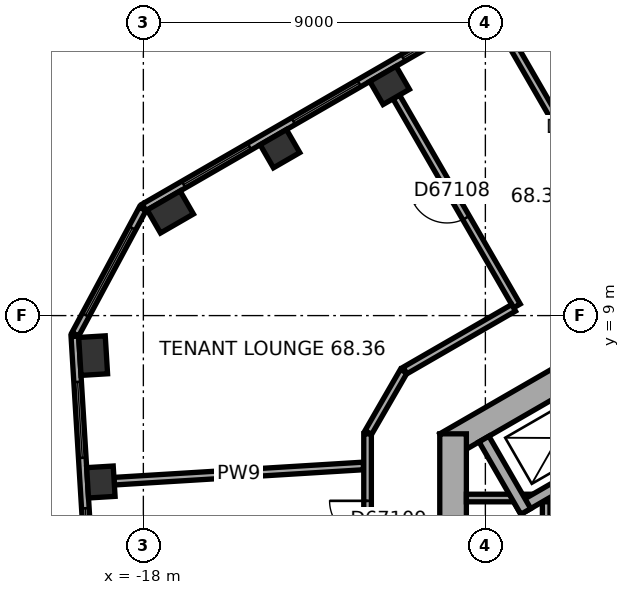
"""IFC4 building model, lengths in metres.
Left out: names, types, materials, properties, quantities, classifications, styles, units other than length and angle.
Written with IfcOpenShell. Run it as: python <this file> out.ifc"""

import sys

from ifc_helpers import new_model, si_unit, direction, frame, frame_2d, origin, origin_2d, place, context, subcontext, project, spatial, rectangle, extrude, element, fill, save


model = new_model("IFC4")
c1 = context("Model", 3, precision=1e-05, world=origin(), true_north=direction((0.0, 1.0)))
c2 = subcontext(c1, "Body", "Model", "MODEL_VIEW")
j1 = project(units=[si_unit("LENGTHUNIT", "METRE"), si_unit("PLANEANGLEUNIT", "RADIAN")], contexts=[c1])
p1 = place(None, origin())
s1 = spatial("IfcSite", under=j1, at=p1, CompositionType="ELEMENT")
p2 = place(p1, origin())
s2 = spatial("IfcBuilding", under=s1, at=p2, CompositionType="ELEMENT")
p3 = place(p2, frame((0.0, 0.0, 274.6)))
s3 = spatial("IfcBuildingStorey", under=s2, at=p3, CompositionType="ELEMENT", Elevation=274.6)
for number, where, z_axis, x_axis in (
    (1, (-11.52, 15.057, 0.0), (0.0, 0.0, 1.0), (-0.866, -0.5, 0.0)),
    (2, (-14.406, 13.391, 0.0), (0.0, 0.0, 1.0), (-0.866, -0.5, 0.0)),
):
    element("IfcColumn", number, at=place(p3, frame(where, z_axis=z_axis, x_axis=x_axis)), inside=s3, PredefinedType="COLUMN", context=c2, shape_type="SweptSolid", body=[
        extrude(rectangle(XDim=0.8, YDim=0.7, at=origin_2d()), origin(), (0.0, 0.0, 1.0), 3.7),
    ])
for number, where, z_axis, x_axis in (
    (3, (-17.291, 11.726, 0.0), (0.0, 0.0, 1.0), (-0.866, -0.5, 0.0)),
    (4, (-19.321, 7.947, 0.0), (0.0, 0.0, 1.0), (0.061, -0.998, 0.0)),
):
    element("IfcColumn", number, at=place(p3, frame(where, z_axis=z_axis, x_axis=x_axis)), inside=s3, PredefinedType="COLUMN", context=c2, shape_type="SweptSolid", body=[
        extrude(rectangle(XDim=1.0, YDim=0.7, at=origin_2d()), origin(), (0.0, 0.0, 1.0), 3.7),
    ])
p4 = place(p3, frame((-19.118, 4.621, 0.0), z_axis=(0.0, 0.0, 1.0), x_axis=(0.061048539535, -0.998134798422, 0.0)))
e5 = element("IfcColumn", 5, at=p4, inside=s3, PredefinedType="COLUMN", context=c2, shape_type="SweptSolid", body=[
    extrude(rectangle(XDim=0.8, YDim=0.7, at=origin_2d()), origin(), (0.0, 0.0, 1.0), 3.7),
])
p5 = place(p3, frame((0.175, 11.475, 0.0), z_axis=(0.0, 0.0, 1.0), x_axis=(-0.866026453023, -0.499998182661, 0.0)))
e6 = element("IfcWall", 6, at=p5, inside=s3, PredefinedType="SHEAR", context=c2, shape_type="SweptSolid", body=[
    extrude(rectangle(XDim=11.778, YDim=0.7, at=frame_2d((5.889, 0.0))), origin(), (0.0, 0.0, 1.0), 3.7),
])
p6 = place(p5, frame((6.089, 0.0, 0.0)))
e7 = element("IfcOpeningElement", 7, at=p6, cuts=e6, PredefinedType="OPENING", context=c2, shape_type="SweptSolid", body=[
    extrude(rectangle(XDim=1.5, YDim=2.1, at=frame_2d((0.75, 1.05))), frame((0.0, 0.36, 0.0), z_axis=(0.0, -1.0, 0.0), x_axis=(1.0, 0.0, 0.0)), (0.0, 0.0, 1.0), 0.72),
])
p7 = place(p5, frame((1.639, 0.0, 0.0)))
e8 = element("IfcOpeningElement", 8, at=p7, cuts=e6, PredefinedType="OPENING", context=c2, shape_type="SweptSolid", body=[
    extrude(rectangle(XDim=0.9, YDim=2.1, at=frame_2d((0.45, 1.05))), frame((0.0, 0.36, 0.0), z_axis=(0.0, -1.0, 0.0), x_axis=(1.0, 0.0, 0.0)), (0.0, 0.0, 1.0), 0.72),
])
p8 = place(p5, frame((4.239, 0.0, 0.0)))
e9 = element("IfcOpeningElement", 9, at=p8, cuts=e6, PredefinedType="OPENING", context=c2, shape_type="SweptSolid", body=[
    extrude(rectangle(XDim=0.9, YDim=2.1, at=frame_2d((0.45, 1.05))), frame((0.0, 0.36, 0.0), z_axis=(0.0, -1.0, 0.0), x_axis=(1.0, 0.0, 0.0)), (0.0, 0.0, 1.0), 0.72),
])
p9 = place(p3, frame((-9.85, 5.889, 0.0), z_axis=(0.0, 0.0, 1.0), x_axis=(0.0, -1.0, 0.0)))
e10 = element("IfcWall", 10, at=p9, inside=s3, PredefinedType="SHEAR", context=c2, shape_type="SweptSolid", body=[
    extrude(rectangle(XDim=11.778, YDim=0.7, at=frame_2d((5.889, 0.0))), origin(), (0.0, 0.0, 1.0), 3.7),
])
p10 = place(p9, frame((5.039, 0.0, 0.0)))
e11 = element("IfcOpeningElement", 11, at=p10, cuts=e10, PredefinedType="OPENING", context=c2, shape_type="SweptSolid", body=[
    extrude(rectangle(XDim=1.1, YDim=2.1, at=frame_2d((0.55, 1.05))), frame((0.0, 0.36, 0.0), z_axis=(0.0, -1.0, 0.0), x_axis=(1.0, 0.0, 0.0)), (0.0, 0.0, 1.0), 0.72),
])
p11 = place(p9, frame((7.639, 0.0, 0.0)))
e12 = element("IfcOpeningElement", 12, at=p11, cuts=e10, PredefinedType="OPENING", context=c2, shape_type="SweptSolid", body=[
    extrude(rectangle(XDim=1.1, YDim=2.1, at=frame_2d((0.55, 1.05))), frame((0.0, 0.36, 0.0), z_axis=(0.0, -1.0, 0.0), x_axis=(1.0, 0.0, 0.0)), (0.0, 0.0, 1.0), 0.72),
])
p12 = place(p3, frame((-2.624, 20.713, 0.0), z_axis=(0.0, 0.0, 1.0), x_axis=(-0.866026460444, -0.499998169808, 0.0)))
e13 = element("IfcWall", 13, at=p12, inside=s3, PredefinedType="STANDARD", context=c2, shape_type="SweptSolid", body=[
    extrude(rectangle(XDim=17.731, YDim=0.2, at=frame_2d((8.866, 0.0))), origin(), (0.0, 0.0, 1.0), 3.7),
])
p13 = place(p12, frame((1.203, 0.0, 0.9)))
e14 = element("IfcOpeningElement", 14, at=p13, cuts=e13, PredefinedType="OPENING", context=c2, shape_type="SweptSolid", body=[
    extrude(rectangle(XDim=2.0, YDim=2.0, at=frame_2d((1.0, 1.0))), frame((0.0, 0.11, 0.0), z_axis=(0.0, -1.0, 0.0), x_axis=(1.0, 0.0, 0.0)), (0.0, 0.0, 1.0), 0.22),
])
p14 = place(p12, frame((4.535, 0.0, 0.9)))
e15 = element("IfcOpeningElement", 15, at=p14, cuts=e13, PredefinedType="OPENING", context=c2, shape_type="SweptSolid", body=[
    extrude(rectangle(XDim=2.0, YDim=2.0, at=frame_2d((1.0, 1.0))), frame((0.0, 0.11, 0.0), z_axis=(0.0, -1.0, 0.0), x_axis=(1.0, 0.0, 0.0)), (0.0, 0.0, 1.0), 0.22),
])
p15 = place(p12, frame((7.867, 0.0, 0.9)))
e16 = element("IfcOpeningElement", 16, at=p15, cuts=e13, PredefinedType="OPENING", context=c2, shape_type="SweptSolid", body=[
    extrude(rectangle(XDim=2.0, YDim=2.0, at=frame_2d((1.0, 1.0))), frame((0.0, 0.11, 0.0), z_axis=(0.0, -1.0, 0.0), x_axis=(1.0, 0.0, 0.0)), (0.0, 0.0, 1.0), 0.22),
])
p16 = place(p12, frame((11.198, 0.0, 0.9)))
e17 = element("IfcOpeningElement", 17, at=p16, cuts=e13, PredefinedType="OPENING", context=c2, shape_type="SweptSolid", body=[
    extrude(rectangle(XDim=2.0, YDim=2.0, at=frame_2d((1.0, 1.0))), frame((0.0, 0.11, 0.0), z_axis=(0.0, -1.0, 0.0), x_axis=(1.0, 0.0, 0.0)), (0.0, 0.0, 1.0), 0.22),
])
p17 = place(p12, frame((14.53, 0.0, 0.9)))
e18 = element("IfcOpeningElement", 18, at=p17, cuts=e13, PredefinedType="OPENING", context=c2, shape_type="SweptSolid", body=[
    extrude(rectangle(XDim=2.0, YDim=2.0, at=frame_2d((1.0, 1.0))), frame((0.0, 0.11, 0.0), z_axis=(0.0, -1.0, 0.0), x_axis=(1.0, 0.0, 0.0)), (0.0, 0.0, 1.0), 0.22),
])
p18 = place(p3, frame((-18.018, 11.808, 0.0), z_axis=(0.0, 0.0, 1.0), x_axis=(-0.473318619185, -0.880891301315, 0.0)))
e19 = element("IfcWall", 19, at=p18, inside=s3, PredefinedType="STANDARD", context=c2, shape_type="SweptSolid", body=[
    extrude(rectangle(XDim=3.747, YDim=0.2, at=frame_2d((1.874, 0.0))), origin(), (0.0, 0.0, 1.0), 3.7),
])
p19 = place(p18, frame((0.573, 0.0, 0.9)))
e20 = element("IfcOpeningElement", 20, at=p19, cuts=e19, PredefinedType="OPENING", context=c2, shape_type="SweptSolid", body=[
    extrude(rectangle(XDim=2.6, YDim=2.0, at=frame_2d((1.3, 1.0))), frame((0.0, 0.11, 0.0), z_axis=(0.0, -1.0, 0.0), x_axis=(1.0, 0.0, 0.0)), (0.0, 0.0, 1.0), 0.22),
])
p20 = place(p3, frame((-19.803, 8.454, 0.0), z_axis=(0.0, 0.0, 1.0), x_axis=(0.061036717565, -0.998135521414, 0.0)))
e21 = element("IfcWall", 21, at=p20, inside=s3, PredefinedType="STANDARD", context=c2, shape_type="SweptSolid", body=[
    extrude(rectangle(XDim=17.731, YDim=0.2, at=frame_2d((8.866, 0.0))), origin(), (0.0, 0.0, 1.0), 3.7),
])
p21 = place(p20, frame((1.202, 0.0, 0.9)))
e22 = element("IfcOpeningElement", 22, at=p21, cuts=e21, PredefinedType="OPENING", context=c2, shape_type="SweptSolid", body=[
    extrude(rectangle(XDim=2.0, YDim=2.0, at=frame_2d((1.0, 1.0))), frame((0.0, 0.11, 0.0), z_axis=(0.0, -1.0, 0.0), x_axis=(1.0, 0.0, 0.0)), (0.0, 0.0, 1.0), 0.22),
])
p22 = place(p20, frame((4.533, 0.0, 0.9)))
e23 = element("IfcOpeningElement", 23, at=p22, cuts=e21, PredefinedType="OPENING", context=c2, shape_type="SweptSolid", body=[
    extrude(rectangle(XDim=2.0, YDim=2.0, at=frame_2d((1.0, 1.0))), frame((0.0, 0.11, 0.0), z_axis=(0.0, -1.0, 0.0), x_axis=(1.0, 0.0, 0.0)), (0.0, 0.0, 1.0), 0.22),
])
p23 = place(p20, frame((7.865, 0.0, 0.9)))
e24 = element("IfcOpeningElement", 24, at=p23, cuts=e21, PredefinedType="OPENING", context=c2, shape_type="SweptSolid", body=[
    extrude(rectangle(XDim=2.0, YDim=2.0, at=frame_2d((1.0, 1.0))), frame((0.0, 0.11, 0.0), z_axis=(0.0, -1.0, 0.0), x_axis=(1.0, 0.0, 0.0)), (0.0, 0.0, 1.0), 0.22),
])
p24 = place(p20, frame((11.197, 0.0, 0.9)))
e25 = element("IfcOpeningElement", 25, at=p24, cuts=e21, PredefinedType="OPENING", context=c2, shape_type="SweptSolid", body=[
    extrude(rectangle(XDim=2.0, YDim=2.0, at=frame_2d((1.0, 1.0))), frame((0.0, 0.11, 0.0), z_axis=(0.0, -1.0, 0.0), x_axis=(1.0, 0.0, 0.0)), (0.0, 0.0, 1.0), 0.22),
])
p25 = place(p20, frame((14.528, 0.0, 0.9)))
e26 = element("IfcOpeningElement", 26, at=p25, cuts=e21, PredefinedType="OPENING", context=c2, shape_type="SweptSolid", body=[
    extrude(rectangle(XDim=2.0, YDim=2.0, at=frame_2d((1.0, 1.0))), frame((0.0, 0.11, 0.0), z_axis=(0.0, -1.0, 0.0), x_axis=(1.0, 0.0, 0.0)), (0.0, 0.0, 1.0), 0.22),
])
p26 = place(p3, frame((-7.4, 4.3, 0.0), z_axis=(0.0, 0.0, 1.0), x_axis=(0.0, -1.0, 0.0)))
e27 = element("IfcWall", 27, at=p26, inside=s3, PredefinedType="PARTITIONING", context=c2, shape_type="SweptSolid", body=[
    extrude(rectangle(XDim=8.0, YDim=0.2, at=frame_2d((4.0, 0.0))), origin(), (0.0, 0.0, 1.0), 3.35),
])
p27 = place(p3, frame((-7.3, 4.2, 0.0), z_axis=(0.0, 0.0, 1.0), x_axis=(-1.0, 0.0, 0.0)))
e28 = element("IfcWall", 28, at=p27, inside=s3, PredefinedType="PARTITIONING", context=c2, shape_type="SweptSolid", body=[
    extrude(rectangle(XDim=2.2, YDim=0.2, at=frame_2d((1.1, 0.0))), origin(), (0.0, 0.0, 1.0), 3.35),
])
p28 = place(p3, frame((-5.24, 5.577, 0.0), z_axis=(0.0, 0.0, 1.0), x_axis=(-0.866014461049, -0.500018952895, 0.0)))
e29 = element("IfcWall", 29, at=p28, inside=s3, PredefinedType="SHEAR", context=c2, shape_type="SweptSolid", body=[
    extrude(rectangle(XDim=3.35, YDim=0.3, at=frame_2d((1.675, 0.0))), origin(), (0.0, 0.0, 1.0), 3.35),
])
p29 = place(p3, frame((-7.937, 3.847, 0.0), z_axis=(0.0, 0.0, 1.0), x_axis=(-0.50002983664, 0.866008176907, 0.0)))
e30 = element("IfcWall", 30, at=p29, inside=s3, PredefinedType="SHEAR", context=c2, shape_type="SweptSolid", body=[
    extrude(rectangle(XDim=2.2, YDim=0.3, at=frame_2d((1.1, 0.0))), origin(), (0.0, 0.0, 1.0), 3.35),
])
p30 = place(p3, frame((-18.768, 4.643, 0.0), z_axis=(0.0, 0.0, 1.0), x_axis=(0.99813496285, 0.0610458511, 0.0)))
e31 = element("IfcWall", 31, at=p30, inside=s3, PredefinedType="PARTITIONING", context=c2, shape_type="SweptSolid", body=[
    extrude(rectangle(XDim=6.571, YDim=0.2, at=frame_2d((3.285, 0.0))), origin(), (0.0, 0.0, 1.0), 3.35),
])
p31 = place(p3, frame((-12.1, 5.889, 0.0), z_axis=(0.0, 0.0, 1.0), x_axis=(0.0, -1.0, 0.0)))
e32 = element("IfcWall", 32, at=p31, inside=s3, PredefinedType="PARTITIONING", context=c2, shape_type="SweptSolid", body=[
    extrude(rectangle(XDim=3.688, YDim=0.2, at=frame_2d((1.844, 0.0))), origin(), (0.0, 0.0, 1.0), 3.35),
])
p32 = place(p31, frame((1.763, 0.0, 0.0)))
e33 = element("IfcOpeningElement", 33, at=p32, cuts=e32, PredefinedType="OPENING", context=c2, shape_type="SweptSolid", body=[
    extrude(rectangle(XDim=1.0, YDim=2.1, at=frame_2d((0.5, 1.05))), frame((0.0, 0.11, 0.0), z_axis=(0.0, -1.0, 0.0), x_axis=(1.0, 0.0, 0.0)), (0.0, 0.0, 1.0), 0.22),
])
p33 = place(p3, frame((-11.345, 14.754, 0.0), z_axis=(0.0, 0.0, 1.0), x_axis=(0.500005339912, -0.866022320763, 0.0)))
e34 = element("IfcWall", 34, at=p33, inside=s3, PredefinedType="PARTITIONING", context=c2, shape_type="SweptSolid", body=[
    extrude(rectangle(XDim=6.35, YDim=0.2, at=frame_2d((3.175, 0.0))), origin(), (0.0, 0.0, 1.0), 3.35),
])
p34 = place(p33, frame((2.675, 0.0, 0.0)))
e35 = element("IfcOpeningElement", 35, at=p34, cuts=e34, PredefinedType="OPENING", context=c2, shape_type="SweptSolid", body=[
    extrude(rectangle(XDim=1.0, YDim=2.1, at=frame_2d((0.5, 1.05))), frame((0.0, 0.11, 0.0), z_axis=(0.0, -1.0, 0.0), x_axis=(1.0, 0.0, 0.0)), (0.0, 0.0, 1.0), 0.22),
])
p35 = place(p3, frame((-11.15, 7.534, 0.0), z_axis=(0.0, 0.0, 1.0), x_axis=(-0.500063286585, -0.865988862174, 0.0)))
e36 = element("IfcWall", 36, at=p35, inside=s3, PredefinedType="PARTITIONING", context=c2, shape_type="SweptSolid", body=[
    extrude(rectangle(XDim=1.86, YDim=0.2, at=frame_2d((0.93, 0.0))), origin(), (0.0, 0.0, 1.0), 3.35),
])
p36 = place(p3, frame((-8.46, 16.42, 0.0), z_axis=(0.0, 0.0, 1.0), x_axis=(0.500005339912, -0.866022320763, 0.0)))
e37 = element("IfcWall", 37, at=p36, inside=s3, PredefinedType="PARTITIONING", context=c2, shape_type="SweptSolid", body=[
    extrude(rectangle(XDim=6.35, YDim=0.2, at=frame_2d((3.175, 0.0))), origin(), (0.0, 0.0, 1.0), 2.65),
])
p37 = place(p36, frame((2.675, 0.0, 0.0)))
e38 = element("IfcOpeningElement", 38, at=p37, cuts=e37, PredefinedType="OPENING", context=c2, shape_type="SweptSolid", body=[
    extrude(rectangle(XDim=1.0, YDim=2.1, at=frame_2d((0.5, 1.05))), frame((0.0, 0.11, 0.0), z_axis=(0.0, -1.0, 0.0), x_axis=(1.0, 0.0, 0.0)), (0.0, 0.0, 1.0), 0.22),
])
p38 = place(p3, frame((-8.257, 9.205, 0.0), z_axis=(0.0, 0.0, 1.0), x_axis=(-0.866031626602, -0.49998922161, 0.0)))
e39 = element("IfcWall", 39, at=p38, inside=s3, PredefinedType="PARTITIONING", context=c2, shape_type="SweptSolid", body=[
    extrude(rectangle(XDim=3.301, YDim=0.2, at=frame_2d((1.65, 0.0))), origin(), (0.0, 0.0, 1.0), 3.35),
])
p39 = place(p15, origin())
e40 = element("IfcWindow", 40, at=p39, inside=s3, PartitioningType="SINGLE_PANEL", PredefinedType="WINDOW", context=c2, shape_type="SweptSolid", body=[
    extrude(rectangle(XDim=2.0, YDim=2.0, at=frame_2d((1.0, 1.0))), frame((0.0, 0.03, 0.0), z_axis=(0.0, -1.0, 0.0), x_axis=(1.0, 0.0, 0.0)), (0.0, 0.0, 1.0), 0.06),
])
fill(e16, e40)
p40 = place(p16, origin())
e41 = element("IfcWindow", 41, at=p40, inside=s3, PartitioningType="SINGLE_PANEL", PredefinedType="WINDOW", context=c2, shape_type="SweptSolid", body=[
    extrude(rectangle(XDim=2.0, YDim=2.0, at=frame_2d((1.0, 1.0))), frame((0.0, 0.03, 0.0), z_axis=(0.0, -1.0, 0.0), x_axis=(1.0, 0.0, 0.0)), (0.0, 0.0, 1.0), 0.06),
])
fill(e17, e41)
p41 = place(p17, origin())
e42 = element("IfcWindow", 42, at=p41, inside=s3, PartitioningType="SINGLE_PANEL", PredefinedType="WINDOW", context=c2, shape_type="SweptSolid", body=[
    extrude(rectangle(XDim=2.0, YDim=2.0, at=frame_2d((1.0, 1.0))), frame((0.0, 0.03, 0.0), z_axis=(0.0, -1.0, 0.0), x_axis=(1.0, 0.0, 0.0)), (0.0, 0.0, 1.0), 0.06),
])
fill(e18, e42)
p42 = place(p19, origin())
e43 = element("IfcWindow", 43, at=p42, inside=s3, PartitioningType="SINGLE_PANEL", PredefinedType="WINDOW", context=c2, shape_type="SweptSolid", body=[
    extrude(rectangle(XDim=2.6, YDim=2.0, at=frame_2d((1.3, 1.0))), frame((0.0, 0.03, 0.0), z_axis=(0.0, -1.0, 0.0), x_axis=(1.0, 0.0, 0.0)), (0.0, 0.0, 1.0), 0.06),
])
fill(e20, e43)
p43 = place(p21, origin())
e44 = element("IfcWindow", 44, at=p43, inside=s3, PartitioningType="SINGLE_PANEL", PredefinedType="WINDOW", context=c2, shape_type="SweptSolid", body=[
    extrude(rectangle(XDim=2.0, YDim=2.0, at=frame_2d((1.0, 1.0))), frame((0.0, 0.03, 0.0), z_axis=(0.0, -1.0, 0.0), x_axis=(1.0, 0.0, 0.0)), (0.0, 0.0, 1.0), 0.06),
])
fill(e22, e44)
p44 = place(p22, origin())
e45 = element("IfcWindow", 45, at=p44, inside=s3, PartitioningType="SINGLE_PANEL", PredefinedType="WINDOW", context=c2, shape_type="SweptSolid", body=[
    extrude(rectangle(XDim=2.0, YDim=2.0, at=frame_2d((1.0, 1.0))), frame((0.0, 0.03, 0.0), z_axis=(0.0, -1.0, 0.0), x_axis=(1.0, 0.0, 0.0)), (0.0, 0.0, 1.0), 0.06),
])
fill(e23, e45)
p45 = place(p34, origin())
e46 = element("IfcDoor", 46, at=p45, inside=s3, OperationType="SINGLE_SWING_LEFT", PredefinedType="DOOR", context=c2, shape_type="SweptSolid", body=[
    extrude(rectangle(XDim=1.0, YDim=2.1, at=frame_2d((0.5, 1.05))), frame((0.0, 0.025, 0.0), z_axis=(0.0, -1.0, 0.0), x_axis=(1.0, 0.0, 0.0)), (0.0, 0.0, 1.0), 0.05),
])
fill(e35, e46)
p46 = place(p32, origin())
e47 = element("IfcDoor", 47, at=p46, inside=s3, OperationType="SINGLE_SWING_LEFT", PredefinedType="DOOR", context=c2, shape_type="SweptSolid", body=[
    extrude(rectangle(XDim=1.0, YDim=2.1, at=frame_2d((0.5, 1.05))), frame((0.0, 0.025, 0.0), z_axis=(0.0, -1.0, 0.0), x_axis=(1.0, 0.0, 0.0)), (0.0, 0.0, 1.0), 0.05),
])
fill(e33, e47)
save(model, sys.argv[1])
